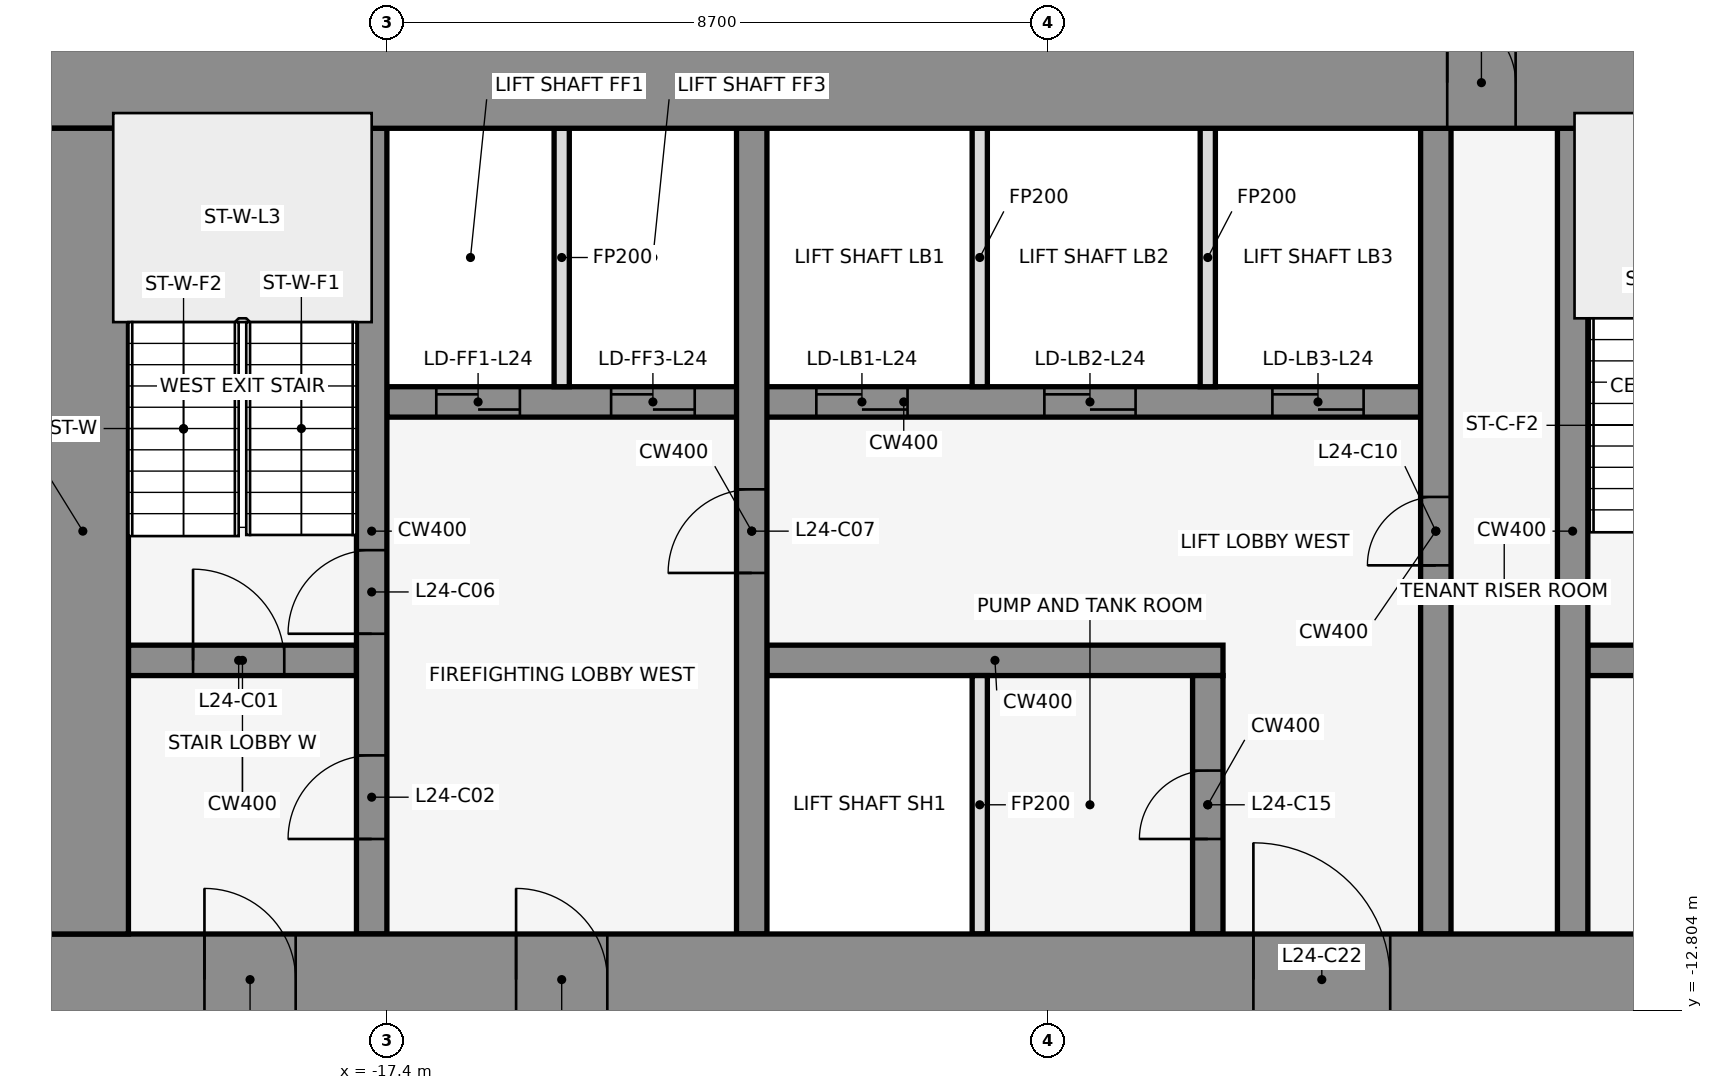
"""IFC4 building model, lengths in metres.
Left out: names, types, materials, properties, quantities, classifications, styles, units other than length and angle.
Written with IfcOpenShell. Run it as: python <this file> out.ifc"""

import sys

from ifc_helpers import new_model, si_unit, direction, frame, frame_2d, origin, place, context, subcontext, project, spatial, rectangle, extrude, element, fill, save


model = new_model("IFC4")
c1 = context("Model", 3, precision=1e-05, world=origin(), true_north=direction((0.0, 1.0)))
c2 = subcontext(c1, "Body", "Model", "MODEL_VIEW")
j1 = project(units=[si_unit("LENGTHUNIT", "METRE"), si_unit("PLANEANGLEUNIT", "RADIAN")], contexts=[c1])
p1 = place(None, origin())
s1 = spatial("IfcSite", under=j1, at=p1, CompositionType="ELEMENT")
p2 = place(p1, origin())
s2 = spatial("IfcBuilding", under=s1, at=p2, CompositionType="ELEMENT")
p3 = place(p2, frame((0.0, 0.0, 114.5)))
s3 = spatial("IfcBuildingStorey", under=s2, at=p3, CompositionType="ELEMENT", Elevation=114.5)
for number, where, z_axis, x_axis in (
    (1, (-0.068, -0.105, 0.0), (0.0, 0.0, 1.0), (-0.84, 0.543, 0.0)),
    (2, (-14.599, 1.08, 0.0), (0.0, 0.0, 1.0), (-0.84, -0.543, 0.0)),
):
    element("IfcWall", number, at=place(p3, frame(where, z_axis=z_axis, x_axis=x_axis)), inside=s3, PredefinedType="STANDARD", context=c2, shape_type="SweptSolid", body=[
        extrude(rectangle(XDim=2.183, YDim=0.25, at=frame_2d((1.091, 0.0))), origin(), (0.0, 0.0, 1.0), 3.95),
    ])
p4 = place(p3, frame((-20.8, -8.2, 0.0), z_axis=(0.0, 0.0, 1.0), x_axis=(1.0, 0.0, 0.0)))
e3 = element("IfcWall", 3, at=p4, inside=s3, PredefinedType="SHEAR", context=c2, shape_type="SweptSolid", body=[
    extrude(rectangle(XDim=3.0, YDim=0.4, at=frame_2d((1.5, 0.0))), origin(), (0.0, 0.0, 1.0), 4.1),
])
p5 = place(p4, frame((0.85, 0.0, 0.0)))
e4 = element("IfcOpeningElement", 4, at=p5, cuts=e3, PredefinedType="OPENING", context=c2, shape_type="SweptSolid", body=[
    extrude(rectangle(XDim=1.2, YDim=2.1, at=frame_2d((0.6, 1.05))), frame((0.0, 0.212, 0.0), z_axis=(0.0, -1.0, 0.0), x_axis=(1.0, 0.0, 0.0)), (0.0, 0.0, 1.0), 0.424),
])
p6 = place(p3, frame((-12.4, -8.2, 0.0), z_axis=(0.0, 0.0, 1.0), x_axis=(1.0, 0.0, 0.0)))
e5 = element("IfcWall", 5, at=p6, inside=s3, PredefinedType="SHEAR", context=c2, shape_type="SweptSolid", body=[
    extrude(rectangle(XDim=6.0, YDim=0.4, at=frame_2d((3.0, 0.0))), origin(), (0.0, 0.0, 1.0), 4.1),
])
p7 = place(p3, frame((-1.6, -8.2, 0.0), z_axis=(0.0, 0.0, 1.0), x_axis=(1.0, 0.0, 0.0)))
e6 = element("IfcWall", 6, at=p7, inside=s3, PredefinedType="SHEAR", context=c2, shape_type="SweptSolid", body=[
    extrude(rectangle(XDim=3.2, YDim=0.4, at=frame_2d((1.6, 0.0))), origin(), (0.0, 0.0, 1.0), 4.1),
])
p8 = place(p7, frame((1.05, 0.0, 0.0)))
e7 = element("IfcOpeningElement", 7, at=p8, cuts=e6, PredefinedType="OPENING", context=c2, shape_type="SweptSolid", body=[
    extrude(rectangle(XDim=1.2, YDim=2.1, at=frame_2d((0.6, 1.05))), frame((0.0, 0.212, 0.0), z_axis=(0.0, -1.0, 0.0), x_axis=(1.0, 0.0, 0.0)), (0.0, 0.0, 1.0), 0.424),
])
p9 = place(p3, frame((-17.4, -4.8, 0.0), z_axis=(0.0, 0.0, 1.0), x_axis=(1.0, 0.0, 0.0)))
e8 = element("IfcWall", 8, at=p9, inside=s3, PredefinedType="SHEAR", context=c2, shape_type="SweptSolid", body=[
    extrude(rectangle(XDim=13.6, YDim=0.4, at=frame_2d((6.8, 0.0))), origin(), (0.0, 0.0, 1.0), 4.1),
])
p10 = place(p9, frame((0.65, 0.0, 0.0)))
e9 = element("IfcOpeningElement", 9, at=p10, cuts=e8, PredefinedType="OPENING", context=c2, shape_type="SweptSolid", body=[
    extrude(rectangle(XDim=1.1, YDim=2.1, at=frame_2d((0.55, 1.05))), frame((0.0, 0.212, 0.0), z_axis=(0.0, -1.0, 0.0), x_axis=(1.0, 0.0, 0.0)), (0.0, 0.0, 1.0), 0.424),
])
p11 = place(p9, frame((2.95, 0.0, 0.0)))
e10 = element("IfcOpeningElement", 10, at=p11, cuts=e8, PredefinedType="OPENING", context=c2, shape_type="SweptSolid", body=[
    extrude(rectangle(XDim=1.1, YDim=2.1, at=frame_2d((0.55, 1.05))), frame((0.0, 0.212, 0.0), z_axis=(0.0, -1.0, 0.0), x_axis=(1.0, 0.0, 0.0)), (0.0, 0.0, 1.0), 0.424),
])
p12 = place(p9, frame((5.65, 0.0, 0.0)))
e11 = element("IfcOpeningElement", 11, at=p12, cuts=e8, PredefinedType="OPENING", context=c2, shape_type="SweptSolid", body=[
    extrude(rectangle(XDim=1.2, YDim=2.1, at=frame_2d((0.6, 1.05))), frame((0.0, 0.212, 0.0), z_axis=(0.0, -1.0, 0.0), x_axis=(1.0, 0.0, 0.0)), (0.0, 0.0, 1.0), 0.424),
])
p13 = place(p9, frame((8.65, 0.0, 0.0)))
e12 = element("IfcOpeningElement", 12, at=p13, cuts=e8, PredefinedType="OPENING", context=c2, shape_type="SweptSolid", body=[
    extrude(rectangle(XDim=1.2, YDim=2.1, at=frame_2d((0.6, 1.05))), frame((0.0, 0.212, 0.0), z_axis=(0.0, -1.0, 0.0), x_axis=(1.0, 0.0, 0.0)), (0.0, 0.0, 1.0), 0.424),
])
p14 = place(p9, frame((11.65, 0.0, 0.0)))
e13 = element("IfcOpeningElement", 13, at=p14, cuts=e8, PredefinedType="OPENING", context=c2, shape_type="SweptSolid", body=[
    extrude(rectangle(XDim=1.2, YDim=2.1, at=frame_2d((0.6, 1.05))), frame((0.0, 0.212, 0.0), z_axis=(0.0, -1.0, 0.0), x_axis=(1.0, 0.0, 0.0)), (0.0, 0.0, 1.0), 0.424),
])
p15 = place(p3, frame((-17.6, -11.8, 0.0), z_axis=(0.0, 0.0, 1.0), x_axis=(0.0, 1.0, 0.0)))
e14 = element("IfcWall", 14, at=p15, inside=s3, PredefinedType="SHEAR", context=c2, shape_type="SweptSolid", body=[
    extrude(rectangle(XDim=10.6, YDim=0.4, at=frame_2d((5.3, 0.0))), origin(), (0.0, 0.0, 1.0), 4.1),
])
p16 = place(p15, frame((1.25, 0.0, 0.0)))
e15 = element("IfcOpeningElement", 15, at=p16, cuts=e14, PredefinedType="OPENING", context=c2, shape_type="SweptSolid", body=[
    extrude(rectangle(XDim=1.1, YDim=2.1, at=frame_2d((0.55, 1.05))), frame((0.0, 0.212, 0.0), z_axis=(0.0, -1.0, 0.0), x_axis=(1.0, 0.0, 0.0)), (0.0, 0.0, 1.0), 0.424),
])
p17 = place(p15, frame((3.95, 0.0, 0.0)))
e16 = element("IfcOpeningElement", 16, at=p17, cuts=e14, PredefinedType="OPENING", context=c2, shape_type="SweptSolid", body=[
    extrude(rectangle(XDim=1.1, YDim=2.1, at=frame_2d((0.55, 1.05))), frame((0.0, 0.212, 0.0), z_axis=(0.0, -1.0, 0.0), x_axis=(1.0, 0.0, 0.0)), (0.0, 0.0, 1.0), 0.424),
])
p18 = place(p3, frame((-15.1, -4.6, 0.0), z_axis=(0.0, 0.0, 1.0), x_axis=(0.0, 1.0, 0.0)))
e17 = element("IfcWall", 17, at=p18, inside=s3, PredefinedType="PARTITIONING", context=c2, shape_type="SweptSolid", body=[
    extrude(rectangle(XDim=3.4, YDim=0.2, at=frame_2d((1.7, 0.0))), origin(), (0.0, 0.0, 1.0), 3.018),
])
p19 = place(p3, frame((-12.6, -11.8, 0.0), z_axis=(0.0, 0.0, 1.0), x_axis=(0.0, 1.0, 0.0)))
e18 = element("IfcWall", 18, at=p19, inside=s3, PredefinedType="SHEAR", context=c2, shape_type="SweptSolid", body=[
    extrude(rectangle(XDim=10.6, YDim=0.4, at=frame_2d((5.3, 0.0))), origin(), (0.0, 0.0, 1.0), 4.1),
])
p20 = place(p19, frame((4.75, 0.0, 0.0)))
e19 = element("IfcOpeningElement", 19, at=p20, cuts=e18, PredefinedType="OPENING", context=c2, shape_type="SweptSolid", body=[
    extrude(rectangle(XDim=1.1, YDim=2.1, at=frame_2d((0.55, 1.05))), frame((0.0, 0.212, 0.0), z_axis=(0.0, -1.0, 0.0), x_axis=(1.0, 0.0, 0.0)), (0.0, 0.0, 1.0), 0.424),
])
for number, where, z_axis, x_axis in (
    (20, (-9.6, -11.8, 0.0), (0.0, 0.0, 1.0), (0.0, 1.0, 0.0)),
    (21, (-9.6, -4.6, 0.0), (0.0, 0.0, 1.0), (0.0, 1.0, 0.0)),
):
    element("IfcWall", number, at=place(p3, frame(where, z_axis=z_axis, x_axis=x_axis)), inside=s3, PredefinedType="PARTITIONING", context=c2, shape_type="SweptSolid", body=[
        extrude(rectangle(XDim=3.4, YDim=0.2, at=frame_2d((1.7, 0.0))), origin(), (0.0, 0.0, 1.0), 3.018),
    ])
p21 = place(p3, frame((-6.6, -11.8, 0.0), z_axis=(0.0, 0.0, 1.0), x_axis=(0.0, 1.0, 0.0)))
e22 = element("IfcWall", 22, at=p21, inside=s3, PredefinedType="SHEAR", context=c2, shape_type="SweptSolid", body=[
    extrude(rectangle(XDim=3.4, YDim=0.4, at=frame_2d((1.7, 0.0))), origin(), (0.0, 0.0, 1.0), 4.1),
])
p22 = place(p21, frame((1.25, 0.0, 0.0)))
e23 = element("IfcOpeningElement", 23, at=p22, cuts=e22, PredefinedType="OPENING", context=c2, shape_type="SweptSolid", body=[
    extrude(rectangle(XDim=0.9, YDim=2.1, at=frame_2d((0.45, 1.05))), frame((0.0, 0.212, 0.0), z_axis=(0.0, -1.0, 0.0), x_axis=(1.0, 0.0, 0.0)), (0.0, 0.0, 1.0), 0.424),
])
p23 = place(p3, frame((-6.6, -4.6, 0.0), z_axis=(0.0, 0.0, 1.0), x_axis=(0.0, 1.0, 0.0)))
e24 = element("IfcWall", 24, at=p23, inside=s3, PredefinedType="PARTITIONING", context=c2, shape_type="SweptSolid", body=[
    extrude(rectangle(XDim=3.4, YDim=0.2, at=frame_2d((1.7, 0.0))), origin(), (0.0, 0.0, 1.0), 3.018),
])
p24 = place(p3, frame((-3.6, -11.8, 0.0), z_axis=(0.0, 0.0, 1.0), x_axis=(0.0, 1.0, 0.0)))
e25 = element("IfcWall", 25, at=p24, inside=s3, PredefinedType="SHEAR", context=c2, shape_type="SweptSolid", body=[
    extrude(rectangle(XDim=10.6, YDim=0.4, at=frame_2d((5.3, 0.0))), origin(), (0.0, 0.0, 1.0), 4.1),
])
p25 = place(p24, frame((4.85, 0.0, 0.0)))
e26 = element("IfcOpeningElement", 26, at=p25, cuts=e25, PredefinedType="OPENING", context=c2, shape_type="SweptSolid", body=[
    extrude(rectangle(XDim=0.9, YDim=2.1, at=frame_2d((0.45, 1.05))), frame((0.0, 0.212, 0.0), z_axis=(0.0, -1.0, 0.0), x_axis=(1.0, 0.0, 0.0)), (0.0, 0.0, 1.0), 0.424),
])
p26 = place(p3, frame((-1.8, -11.8, 0.0), z_axis=(0.0, 0.0, 1.0), x_axis=(0.0, 1.0, 0.0)))
e27 = element("IfcWall", 27, at=p26, inside=s3, PredefinedType="SHEAR", context=c2, shape_type="SweptSolid", body=[
    extrude(rectangle(XDim=10.6, YDim=0.4, at=frame_2d((5.3, 0.0))), origin(), (0.0, 0.0, 1.0), 4.1),
])
p27 = place(p3, frame((-22.0, -0.6, 0.0), z_axis=(0.0, 0.0, 1.0), x_axis=(1.0, 0.0, 0.0)))
e28 = element("IfcWall", 28, at=p27, inside=s3, PredefinedType="SHEAR", context=c2, shape_type="SweptSolid", body=[
    extrude(rectangle(XDim=44.0, YDim=1.2, at=frame_2d((22.0, 0.0))), origin(), (0.0, 0.0, 1.0), 4.1),
])
p28 = place(p27, frame((18.55, 0.0, 0.0)))
e29 = element("IfcOpeningElement", 29, at=p28, cuts=e28, PredefinedType="OPENING", context=c2, shape_type="SweptSolid", body=[
    extrude(rectangle(XDim=0.9, YDim=2.1, at=frame_2d((0.45, 1.05))), frame((0.0, 0.612, 0.0), z_axis=(0.0, -1.0, 0.0), x_axis=(1.0, 0.0, 0.0)), (0.0, 0.0, 1.0), 1.224),
])
p29 = place(p27, frame((24.55, 0.0, 0.0)))
e30 = element("IfcOpeningElement", 30, at=p29, cuts=e28, PredefinedType="OPENING", context=c2, shape_type="SweptSolid", body=[
    extrude(rectangle(XDim=0.9, YDim=2.1, at=frame_2d((0.45, 1.05))), frame((0.0, 0.612, 0.0), z_axis=(0.0, -1.0, 0.0), x_axis=(1.0, 0.0, 0.0)), (0.0, 0.0, 1.0), 1.224),
])
p30 = place(p3, frame((-22.0, -12.4, 0.0), z_axis=(0.0, 0.0, 1.0), x_axis=(1.0, 0.0, 0.0)))
e31 = element("IfcWall", 31, at=p30, inside=s3, PredefinedType="SHEAR", context=c2, shape_type="SweptSolid", body=[
    extrude(rectangle(XDim=44.0, YDim=1.2, at=frame_2d((22.0, 0.0))), origin(), (0.0, 0.0, 1.0), 4.1),
])
p31 = place(p30, frame((2.2, 0.0, 0.0)))
e32 = element("IfcOpeningElement", 32, at=p31, cuts=e31, PredefinedType="OPENING", context=c2, shape_type="SweptSolid", body=[
    extrude(rectangle(XDim=1.2, YDim=2.1, at=frame_2d((0.6, 1.05))), frame((0.0, 0.612, 0.0), z_axis=(0.0, -1.0, 0.0), x_axis=(1.0, 0.0, 0.0)), (0.0, 0.0, 1.0), 1.224),
])
p32 = place(p30, frame((21.4, 0.0, 0.0)))
e33 = element("IfcOpeningElement", 33, at=p32, cuts=e31, PredefinedType="OPENING", context=c2, shape_type="SweptSolid", body=[
    extrude(rectangle(XDim=1.2, YDim=2.1, at=frame_2d((0.6, 1.05))), frame((0.0, 0.612, 0.0), z_axis=(0.0, -1.0, 0.0), x_axis=(1.0, 0.0, 0.0)), (0.0, 0.0, 1.0), 1.224),
])
p33 = place(p30, frame((40.6, 0.0, 0.0)))
e34 = element("IfcOpeningElement", 34, at=p33, cuts=e31, PredefinedType="OPENING", context=c2, shape_type="SweptSolid", body=[
    extrude(rectangle(XDim=1.2, YDim=2.1, at=frame_2d((0.6, 1.05))), frame((0.0, 0.612, 0.0), z_axis=(0.0, -1.0, 0.0), x_axis=(1.0, 0.0, 0.0)), (0.0, 0.0, 1.0), 1.224),
])
p34 = place(p30, frame((16.0, 0.0, 0.0)))
e35 = element("IfcOpeningElement", 35, at=p34, cuts=e31, PredefinedType="OPENING", context=c2, shape_type="SweptSolid", body=[
    extrude(rectangle(XDim=1.8, YDim=2.1, at=frame_2d((0.9, 1.05))), frame((0.0, 0.612, 0.0), z_axis=(0.0, -1.0, 0.0), x_axis=(1.0, 0.0, 0.0)), (0.0, 0.0, 1.0), 1.224),
])
p35 = place(p30, frame((6.3, 0.0, 0.0)))
e36 = element("IfcOpeningElement", 36, at=p35, cuts=e31, PredefinedType="OPENING", context=c2, shape_type="SweptSolid", body=[
    extrude(rectangle(XDim=1.2, YDim=2.1, at=frame_2d((0.6, 1.05))), frame((0.0, 0.612, 0.0), z_axis=(0.0, -1.0, 0.0), x_axis=(1.0, 0.0, 0.0)), (0.0, 0.0, 1.0), 1.224),
])
p36 = place(p30, frame((26.2, 0.0, 0.0)))
e37 = element("IfcOpeningElement", 37, at=p36, cuts=e31, PredefinedType="OPENING", context=c2, shape_type="SweptSolid", body=[
    extrude(rectangle(XDim=1.8, YDim=2.1, at=frame_2d((0.9, 1.05))), frame((0.0, 0.612, 0.0), z_axis=(0.0, -1.0, 0.0), x_axis=(1.0, 0.0, 0.0)), (0.0, 0.0, 1.0), 1.224),
])
p37 = place(p30, frame((36.5, 0.0, 0.0)))
e38 = element("IfcOpeningElement", 38, at=p37, cuts=e31, PredefinedType="OPENING", context=c2, shape_type="SweptSolid", body=[
    extrude(rectangle(XDim=1.2, YDim=2.1, at=frame_2d((0.6, 1.05))), frame((0.0, 0.612, 0.0), z_axis=(0.0, -1.0, 0.0), x_axis=(1.0, 0.0, 0.0)), (0.0, 0.0, 1.0), 1.224),
])
p38 = place(p3, frame((-21.4, -11.8, 0.0), z_axis=(0.0, 0.0, 1.0), x_axis=(0.0, 1.0, 0.0)))
e39 = element("IfcWall", 39, at=p38, inside=s3, PredefinedType="SHEAR", context=c2, shape_type="SweptSolid", body=[
    extrude(rectangle(XDim=10.6, YDim=1.2, at=frame_2d((5.3, 0.0))), origin(), (0.0, 0.0, 1.0), 4.1),
])
p39 = place(p5, origin())
e40 = element("IfcDoor", 40, at=p39, inside=s3, OperationType="SINGLE_SWING_LEFT", PredefinedType="DOOR", context=c2, shape_type="SweptSolid", body=[
    extrude(rectangle(XDim=1.2, YDim=2.1, at=frame_2d((0.6, 1.05))), frame((0.0, 0.025, 0.0), z_axis=(0.0, -1.0, 0.0), x_axis=(1.0, 0.0, 0.0)), (0.0, 0.0, 1.0), 0.05),
])
fill(e4, e40)
p40 = place(p16, frame((1.1, 0.0, 0.0), z_axis=(0.0, 0.0, 1.0), x_axis=(-1.0, 0.0, 0.0)))
e41 = element("IfcDoor", 41, at=p40, inside=s3, OperationType="SINGLE_SWING_LEFT", PredefinedType="DOOR", context=c2, shape_type="SweptSolid", body=[
    extrude(rectangle(XDim=1.1, YDim=2.1, at=frame_2d((0.55, 1.05))), frame((0.0, 0.025, 0.0), z_axis=(0.0, -1.0, 0.0), x_axis=(1.0, 0.0, 0.0)), (0.0, 0.0, 1.0), 0.05),
])
fill(e15, e41)
p41 = place(p10, origin())
e42 = element("IfcDoor", 42, at=p41, inside=s3, OperationType="DOUBLE_DOOR_SLIDING", PredefinedType="DOOR", context=c2, shape_type="SweptSolid", body=[
    extrude(rectangle(XDim=1.1, YDim=2.1, at=frame_2d((0.55, 1.05))), frame((0.0, 0.025, 0.0), z_axis=(0.0, -1.0, 0.0), x_axis=(1.0, 0.0, 0.0)), (0.0, 0.0, 1.0), 0.05),
])
fill(e9, e42)
p42 = place(p11, origin())
e43 = element("IfcDoor", 43, at=p42, inside=s3, OperationType="DOUBLE_DOOR_SLIDING", PredefinedType="DOOR", context=c2, shape_type="SweptSolid", body=[
    extrude(rectangle(XDim=1.1, YDim=2.1, at=frame_2d((0.55, 1.05))), frame((0.0, 0.025, 0.0), z_axis=(0.0, -1.0, 0.0), x_axis=(1.0, 0.0, 0.0)), (0.0, 0.0, 1.0), 0.05),
])
fill(e10, e43)
p43 = place(p12, origin())
e44 = element("IfcDoor", 44, at=p43, inside=s3, OperationType="DOUBLE_DOOR_SLIDING", PredefinedType="DOOR", context=c2, shape_type="SweptSolid", body=[
    extrude(rectangle(XDim=1.2, YDim=2.1, at=frame_2d((0.6, 1.05))), frame((0.0, 0.025, 0.0), z_axis=(0.0, -1.0, 0.0), x_axis=(1.0, 0.0, 0.0)), (0.0, 0.0, 1.0), 0.05),
])
fill(e11, e44)
p44 = place(p13, origin())
e45 = element("IfcDoor", 45, at=p44, inside=s3, OperationType="DOUBLE_DOOR_SLIDING", PredefinedType="DOOR", context=c2, shape_type="SweptSolid", body=[
    extrude(rectangle(XDim=1.2, YDim=2.1, at=frame_2d((0.6, 1.05))), frame((0.0, 0.025, 0.0), z_axis=(0.0, -1.0, 0.0), x_axis=(1.0, 0.0, 0.0)), (0.0, 0.0, 1.0), 0.05),
])
fill(e12, e45)
p45 = place(p14, origin())
e46 = element("IfcDoor", 46, at=p45, inside=s3, OperationType="DOUBLE_DOOR_SLIDING", PredefinedType="DOOR", context=c2, shape_type="SweptSolid", body=[
    extrude(rectangle(XDim=1.2, YDim=2.1, at=frame_2d((0.6, 1.05))), frame((0.0, 0.025, 0.0), z_axis=(0.0, -1.0, 0.0), x_axis=(1.0, 0.0, 0.0)), (0.0, 0.0, 1.0), 0.05),
])
fill(e13, e46)
p46 = place(p17, frame((1.1, 0.0, 0.0), z_axis=(0.0, 0.0, 1.0), x_axis=(-1.0, 0.0, 0.0)))
e47 = element("IfcDoor", 47, at=p46, inside=s3, OperationType="SINGLE_SWING_LEFT", PredefinedType="DOOR", context=c2, shape_type="SweptSolid", body=[
    extrude(rectangle(XDim=1.1, YDim=2.1, at=frame_2d((0.55, 1.05))), frame((0.0, 0.025, 0.0), z_axis=(0.0, -1.0, 0.0), x_axis=(1.0, 0.0, 0.0)), (0.0, 0.0, 1.0), 0.05),
])
fill(e16, e47)
p47 = place(p20, origin())
e48 = element("IfcDoor", 48, at=p47, inside=s3, OperationType="SINGLE_SWING_LEFT", PredefinedType="DOOR", context=c2, shape_type="SweptSolid", body=[
    extrude(rectangle(XDim=1.1, YDim=2.1, at=frame_2d((0.55, 1.05))), frame((0.0, 0.025, 0.0), z_axis=(0.0, -1.0, 0.0), x_axis=(1.0, 0.0, 0.0)), (0.0, 0.0, 1.0), 0.05),
])
fill(e19, e48)
p48 = place(p25, frame((0.9, 0.0, 0.0), z_axis=(0.0, 0.0, 1.0), x_axis=(-1.0, 0.0, 0.0)))
e49 = element("IfcDoor", 49, at=p48, inside=s3, OperationType="SINGLE_SWING_LEFT", PredefinedType="DOOR", context=c2, shape_type="SweptSolid", body=[
    extrude(rectangle(XDim=0.9, YDim=2.1, at=frame_2d((0.45, 1.05))), frame((0.0, 0.025, 0.0), z_axis=(0.0, -1.0, 0.0), x_axis=(1.0, 0.0, 0.0)), (0.0, 0.0, 1.0), 0.05),
])
fill(e26, e49)
p49 = place(p22, origin())
e50 = element("IfcDoor", 50, at=p49, inside=s3, OperationType="SINGLE_SWING_LEFT", PredefinedType="DOOR", context=c2, shape_type="SweptSolid", body=[
    extrude(rectangle(XDim=0.9, YDim=2.1, at=frame_2d((0.45, 1.05))), frame((0.0, 0.025, 0.0), z_axis=(0.0, -1.0, 0.0), x_axis=(1.0, 0.0, 0.0)), (0.0, 0.0, 1.0), 0.05),
])
fill(e23, e50)
p50 = place(p28, origin())
e51 = element("IfcDoor", 51, at=p50, inside=s3, OperationType="SINGLE_SWING_LEFT", PredefinedType="DOOR", context=c2, shape_type="SweptSolid", body=[
    extrude(rectangle(XDim=0.9, YDim=2.1, at=frame_2d((0.45, 1.05))), frame((0.0, 0.025, 0.0), z_axis=(0.0, -1.0, 0.0), x_axis=(1.0, 0.0, 0.0)), (0.0, 0.0, 1.0), 0.05),
])
fill(e29, e51)
p51 = place(p31, frame((1.2, 0.0, 0.0), z_axis=(0.0, 0.0, 1.0), x_axis=(-1.0, 0.0, 0.0)))
e52 = element("IfcDoor", 52, at=p51, inside=s3, OperationType="SINGLE_SWING_RIGHT", PredefinedType="DOOR", context=c2, shape_type="SweptSolid", body=[
    extrude(rectangle(XDim=1.2, YDim=2.1, at=frame_2d((0.6, 1.05))), frame((0.0, 0.025, 0.0), z_axis=(0.0, -1.0, 0.0), x_axis=(1.0, 0.0, 0.0)), (0.0, 0.0, 1.0), 0.05),
])
fill(e32, e52)
p52 = place(p34, origin())
e53 = element("IfcDoor", 53, at=p52, inside=s3, OperationType="SINGLE_SWING_LEFT", PredefinedType="DOOR", context=c2, shape_type="SweptSolid", body=[
    extrude(rectangle(XDim=1.8, YDim=2.1, at=frame_2d((0.9, 1.05))), frame((0.0, 0.025, 0.0), z_axis=(0.0, -1.0, 0.0), x_axis=(1.0, 0.0, 0.0)), (0.0, 0.0, 1.0), 0.05),
])
fill(e35, e53)
p53 = place(p35, frame((1.2, 0.0, 0.0), z_axis=(0.0, 0.0, 1.0), x_axis=(-1.0, 0.0, 0.0)))
e54 = element("IfcDoor", 54, at=p53, inside=s3, OperationType="SINGLE_SWING_RIGHT", PredefinedType="DOOR", context=c2, shape_type="SweptSolid", body=[
    extrude(rectangle(XDim=1.2, YDim=2.1, at=frame_2d((0.6, 1.05))), frame((0.0, 0.025, 0.0), z_axis=(0.0, -1.0, 0.0), x_axis=(1.0, 0.0, 0.0)), (0.0, 0.0, 1.0), 0.05),
])
fill(e36, e54)
save(model, sys.argv[1])
